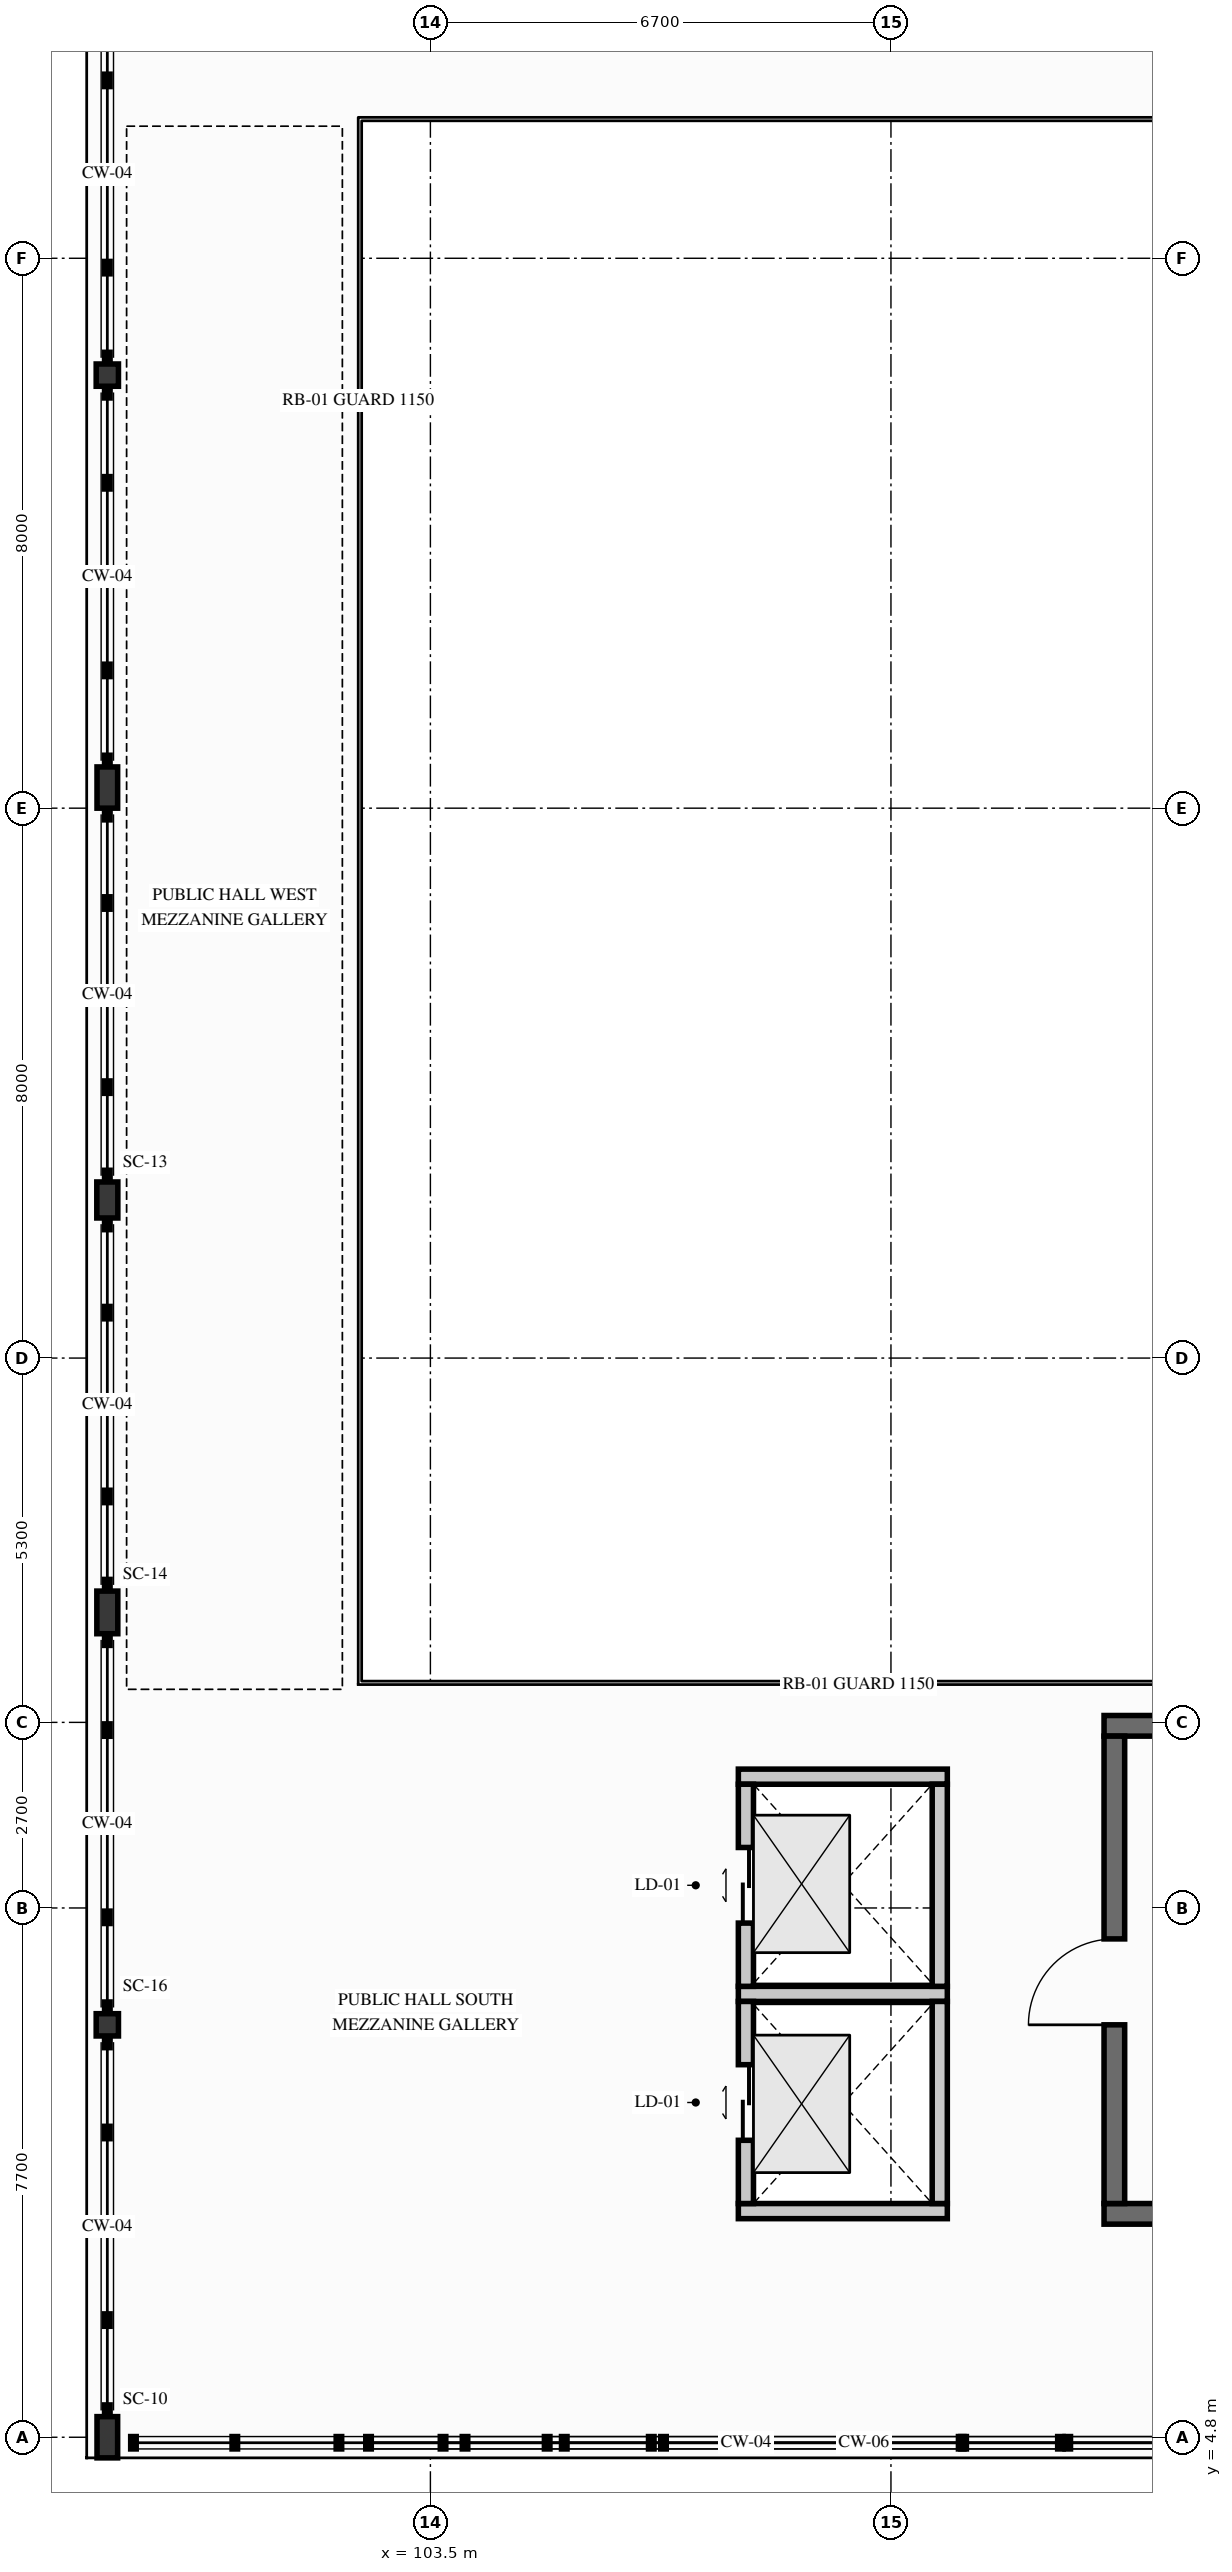
"""IFC4 building model, lengths in metres.
Left out: names, types, materials, properties, quantities, classifications, styles, units other than length and angle.
Written with IfcOpenShell. Run it as: python <this file> out.ifc"""

import sys

from ifc_helpers import new_model, si_unit, direction, frame, frame_2d, origin, origin_2d, place, context, subcontext, project, spatial, rectangle, hollow_circle, i_section, extrude, element, fill, save


model = new_model("IFC4")
c1 = context("Model", 3, precision=1e-05, world=origin(), true_north=direction((0.0, 1.0)))
c2 = subcontext(c1, "Body", "Model", "MODEL_VIEW")
j1 = project(units=[si_unit("LENGTHUNIT", "METRE"), si_unit("PLANEANGLEUNIT", "RADIAN")], contexts=[c1])
p1 = place(None, origin())
s1 = spatial("IfcSite", under=j1, at=p1, CompositionType="ELEMENT")
p2 = place(p1, origin())
s2 = spatial("IfcBuilding", under=s1, at=p2, CompositionType="ELEMENT")
p3 = place(p2, frame((0.0, 0.0, 5.1)))
s3 = spatial("IfcBuildingStorey", under=s2, at=p3, CompositionType="ELEMENT", Elevation=5.1)
for number, where, z_axis, x_axis in (
    (1, (113.3, 8.05, 0.0), (0.0, 0.0, 1.0), (1.0, 0.0, 0.0)),
    (2, (113.3, 15.15, 0.0), (0.0, 0.0, 1.0), (1.0, 0.0, 0.0)),
):
    element("IfcWall", number, at=place(p3, frame(where, z_axis=z_axis, x_axis=x_axis)), inside=s3, PredefinedType="SHEAR", context=c2, shape_type="SweptSolid", body=[
        extrude(rectangle(XDim=8.2, YDim=0.3, at=frame_2d((4.1, 0.0))), origin(), (0.0, 0.0, 1.0), 3.96),
    ])
p4 = place(p3, frame((113.45, 8.2, 0.0), z_axis=(0.0, 0.0, 1.0), x_axis=(0.0, 1.0, 0.0)))
e3 = element("IfcWall", 3, at=p4, inside=s3, PredefinedType="SHEAR", context=c2, shape_type="SweptSolid", body=[
    extrude(rectangle(XDim=6.8, YDim=0.3, at=frame_2d((3.4, 0.0))), origin(), (0.0, 0.0, 1.0), 3.96),
])
p5 = place(p4, frame((2.6, 0.0, 0.0)))
e4 = element("IfcOpeningElement", 4, at=p5, cuts=e3, PredefinedType="OPENING", context=c2, shape_type="SweptSolid", body=[
    extrude(rectangle(XDim=1.25, YDim=2.2, at=frame_2d((0.625, 1.1))), frame((0.0, 0.16, 0.0), z_axis=(0.0, -1.0, 0.0), x_axis=(1.0, 0.0, 0.0)), (0.0, 0.0, 1.0), 0.32),
])
p6 = place(p3, frame((98.8, 4.8, 0.0), z_axis=(0.0, 0.0, 1.0), x_axis=(1.0, 0.0, 0.0)))
e5 = element("IfcColumn", 5, at=p6, inside=s3, PredefinedType="COLUMN", context=c2, shape_type="SweptSolid", body=[
    extrude(i_section(OverallWidth=0.3, OverallDepth=0.6, WebThickness=0.015, FlangeThickness=0.03, FilletRadius=0.027, at=origin_2d()), origin(), (0.0, 0.0, 1.0), 3.92),
])
p7 = place(p3, frame((98.8, 10.8, 0.0), z_axis=(0.0, 0.0, 1.0), x_axis=(1.0, 0.0, 0.0)))
e6 = element("IfcColumn", 6, at=p7, inside=s3, PredefinedType="COLUMN", context=c2, shape_type="SweptSolid", body=[
    extrude(hollow_circle(Radius=0.162, WallThickness=0.016, at=origin_2d()), origin(), (0.0, 0.0, 1.0), 3.92),
])
p8 = place(p3, frame((98.8, 16.8, 0.0), z_axis=(0.0, 0.0, 1.0), x_axis=(1.0, 0.0, 0.0)))
e7 = element("IfcColumn", 7, at=p8, inside=s3, PredefinedType="COLUMN", context=c2, shape_type="SweptSolid", body=[
    extrude(i_section(OverallWidth=0.305, OverallDepth=0.62, WebThickness=0.021, FlangeThickness=0.04, FilletRadius=0.027, at=origin_2d()), origin(), (0.0, 0.0, 1.0), 3.92),
])
p9 = place(p3, frame((98.8, 22.8, 0.0), z_axis=(0.0, 0.0, 1.0), x_axis=(1.0, 0.0, 0.0)))
e8 = element("IfcColumn", 8, at=p9, inside=s3, PredefinedType="COLUMN", context=c2, shape_type="SweptSolid", body=[
    extrude(i_section(OverallWidth=0.306, OverallDepth=0.524, WebThickness=0.021, FlangeThickness=0.04, FilletRadius=0.027, at=origin_2d()), origin(), (0.0, 0.0, 1.0), 3.92),
])
p10 = place(p3, frame((98.8, 28.8, 0.0), z_axis=(0.0, 0.0, 1.0), x_axis=(1.0, 0.0, 0.0)))
e9 = element("IfcColumn", 9, at=p10, inside=s3, PredefinedType="COLUMN", context=c2, shape_type="SweptSolid", body=[
    extrude(i_section(OverallWidth=0.3, OverallDepth=0.6, WebThickness=0.015, FlangeThickness=0.03, FilletRadius=0.027, at=origin_2d()), origin(), (0.0, 0.0, 1.0), 3.92),
])
p11 = place(p3, frame((98.8, 34.8, 0.0), z_axis=(0.0, 0.0, 1.0), x_axis=(1.0, 0.0, 0.0)))
e10 = element("IfcColumn", 10, at=p11, inside=s3, PredefinedType="COLUMN", context=c2, shape_type="SweptSolid", body=[
    extrude(hollow_circle(Radius=0.162, WallThickness=0.016, at=origin_2d()), origin(), (0.0, 0.0, 1.0), 3.92),
])
for number, where, z_axis, x_axis in (
    (11, (107.98, 8.09, 0.0), (0.0, 0.0, 1.0), (1.0, 0.0, 0.0)),
    (12, (107.98, 11.25, 0.0), (0.0, 0.0, 1.0), (1.0, 0.0, 0.0)),
):
    element("IfcWall", number, at=place(p3, frame(where, z_axis=z_axis, x_axis=x_axis)), inside=s3, PredefinedType="PARTITIONING", context=c2, shape_type="SweptSolid", body=[
        extrude(rectangle(XDim=3.04, YDim=0.22, at=frame_2d((1.52, 0.0))), origin(), (0.0, 0.0, 1.0), 3.92),
    ])
p12 = place(p3, frame((108.09, 8.2, 0.0), z_axis=(0.0, 0.0, 1.0), x_axis=(0.0, 1.0, 0.0)))
e13 = element("IfcWall", 13, at=p12, inside=s3, PredefinedType="PARTITIONING", context=c2, shape_type="SweptSolid", body=[
    extrude(rectangle(XDim=2.94, YDim=0.22, at=frame_2d((1.47, 0.0))), origin(), (0.0, 0.0, 1.0), 3.662),
])
p13 = place(p12, frame((0.92, 0.0, 0.0)))
e14 = element("IfcOpeningElement", 14, at=p13, cuts=e13, PredefinedType="OPENING", context=c2, shape_type="SweptSolid", body=[
    extrude(rectangle(XDim=1.1, YDim=2.15, at=frame_2d((0.55, 1.075))), frame((0.0, 0.12, 0.0), z_axis=(0.0, -1.0, 0.0), x_axis=(1.0, 0.0, 0.0)), (0.0, 0.0, 1.0), 0.24),
])
p14 = place(p3, frame((110.91, 8.2, 0.0), z_axis=(0.0, 0.0, 1.0), x_axis=(0.0, 1.0, 0.0)))
e15 = element("IfcWall", 15, at=p14, inside=s3, PredefinedType="PARTITIONING", context=c2, shape_type="SweptSolid", body=[
    extrude(rectangle(XDim=2.94, YDim=0.22, at=frame_2d((1.47, 0.0))), origin(), (0.0, 0.0, 1.0), 3.662),
])
p15 = place(p3, frame((107.98, 14.41, 0.0), z_axis=(0.0, 0.0, 1.0), x_axis=(1.0, 0.0, 0.0)))
e16 = element("IfcWall", 16, at=p15, inside=s3, PredefinedType="PARTITIONING", context=c2, shape_type="SweptSolid", body=[
    extrude(rectangle(XDim=3.04, YDim=0.22, at=frame_2d((1.52, 0.0))), origin(), (0.0, 0.0, 1.0), 3.92),
])
p16 = place(p3, frame((108.09, 11.36, 0.0), z_axis=(0.0, 0.0, 1.0), x_axis=(0.0, 1.0, 0.0)))
e17 = element("IfcWall", 17, at=p16, inside=s3, PredefinedType="PARTITIONING", context=c2, shape_type="SweptSolid", body=[
    extrude(rectangle(XDim=2.94, YDim=0.22, at=frame_2d((1.47, 0.0))), origin(), (0.0, 0.0, 1.0), 3.92),
])
p17 = place(p16, frame((0.92, 0.0, 0.0)))
e18 = element("IfcOpeningElement", 18, at=p17, cuts=e17, PredefinedType="OPENING", context=c2, shape_type="SweptSolid", body=[
    extrude(rectangle(XDim=1.1, YDim=2.15, at=frame_2d((0.55, 1.075))), frame((0.0, 0.12, 0.0), z_axis=(0.0, -1.0, 0.0), x_axis=(1.0, 0.0, 0.0)), (0.0, 0.0, 1.0), 0.24),
])
p18 = place(p3, frame((110.91, 11.36, 0.0), z_axis=(0.0, 0.0, 1.0), x_axis=(0.0, 1.0, 0.0)))
e19 = element("IfcWall", 19, at=p18, inside=s3, PredefinedType="PARTITIONING", context=c2, shape_type="SweptSolid", body=[
    extrude(rectangle(XDim=2.94, YDim=0.22, at=frame_2d((1.47, 0.0))), origin(), (0.0, 0.0, 1.0), 3.92),
])
p19 = place(p5, origin())
e20 = element("IfcDoor", 20, at=p19, inside=s3, OperationType="SINGLE_SWING_LEFT", PredefinedType="DOOR", context=c2, shape_type="SweptSolid", body=[
    extrude(rectangle(XDim=1.25, YDim=2.2, at=frame_2d((0.625, 1.1))), frame((0.0, 0.025, 0.0), z_axis=(0.0, -1.0, 0.0), x_axis=(1.0, 0.0, 0.0)), (0.0, 0.0, 1.0), 0.05),
])
fill(e4, e20)
p20 = place(p13, origin())
e21 = element("IfcDoor", 21, at=p20, inside=s3, OperationType="DOUBLE_DOOR_SLIDING", PredefinedType="DOOR", context=c2, shape_type="SweptSolid", body=[
    extrude(rectangle(XDim=1.1, YDim=2.15, at=frame_2d((0.55, 1.075))), frame((0.0, 0.025, 0.0), z_axis=(0.0, -1.0, 0.0), x_axis=(1.0, 0.0, 0.0)), (0.0, 0.0, 1.0), 0.05),
])
fill(e14, e21)
p21 = place(p17, origin())
e22 = element("IfcDoor", 22, at=p21, inside=s3, OperationType="DOUBLE_DOOR_SLIDING", PredefinedType="DOOR", context=c2, shape_type="SweptSolid", body=[
    extrude(rectangle(XDim=1.1, YDim=2.15, at=frame_2d((0.55, 1.075))), frame((0.0, 0.025, 0.0), z_axis=(0.0, -1.0, 0.0), x_axis=(1.0, 0.0, 0.0)), (0.0, 0.0, 1.0), 0.05),
])
fill(e18, e22)
save(model, sys.argv[1])
